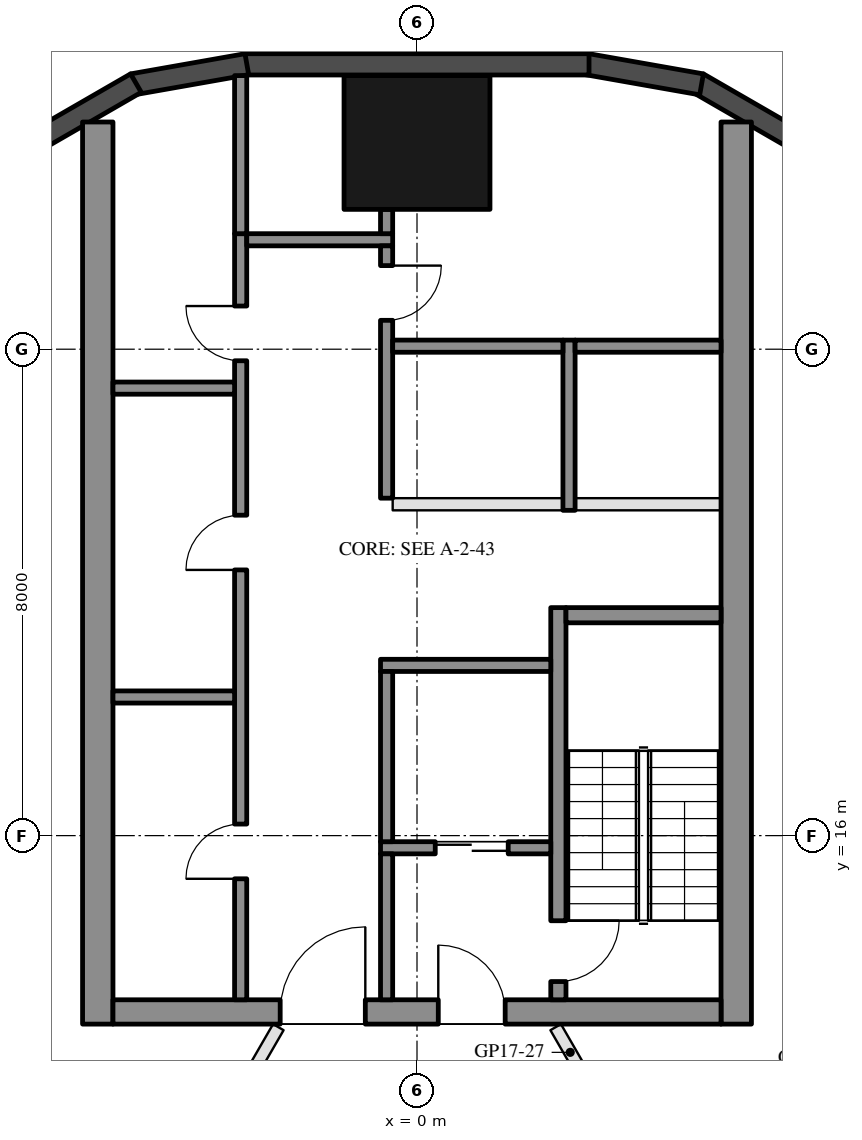
"""IFC4 building model, lengths in metres.
Left out: names, types, materials, properties, quantities, classifications, styles, units other than length and angle.
Written with IfcOpenShell. Run it as: python <this file> out.ifc"""

import sys

from ifc_helpers import new_model, si_unit, direction, frame, frame_2d, origin, origin_2d, place, context, subcontext, project, spatial, rectangle, hollow_rectangle, extrude, element, fill, save


model = new_model("IFC4")
c1 = context("Model", 3, precision=1e-05, world=origin(), true_north=direction((0.0, 1.0)))
c2 = subcontext(c1, "Body", "Model", "MODEL_VIEW")
j1 = project(units=[si_unit("LENGTHUNIT", "METRE"), si_unit("PLANEANGLEUNIT", "RADIAN")], contexts=[c1])
p1 = place(None, origin())
s1 = spatial("IfcSite", under=j1, at=p1, CompositionType="ELEMENT")
p2 = place(p1, origin())
s2 = spatial("IfcBuilding", under=s1, at=p2, CompositionType="ELEMENT")
p3 = place(p2, frame((0.0, 0.0, 183.6)))
s3 = spatial("IfcBuildingStorey", under=s2, at=p3, CompositionType="ELEMENT", Elevation=183.6)
p4 = place(p3, frame((0.0, 27.4, 0.0), z_axis=(0.0, 0.0, 1.0), x_axis=(1.0, 0.0, 0.0)))
e1 = element("IfcColumn", 1, at=p4, inside=s3, PredefinedType="COLUMN", context=c2, shape_type="SweptSolid", body=[
    extrude(hollow_rectangle(XDim=2.4, YDim=2.2, WallThickness=0.06, at=origin_2d()), origin(), (0.0, 0.0, 1.0), 3.7),
])
for number, where, z_axis, x_axis in (
    (2, (6.277, 27.422, 0.0), (0.0, 0.0, 1.0), (-0.866, 0.5, 0.0)),
    (3, (4.68, 28.356, 0.0), (0.0, 0.0, 1.0), (-0.985, 0.174, 0.0)),
):
    element("IfcWall", number, at=place(p3, frame(where, z_axis=z_axis, x_axis=x_axis)), inside=s3, PredefinedType="SOLIDWALL", context=c2, shape_type="SweptSolid", body=[
        extrude(rectangle(XDim=1.91, YDim=0.35, at=frame_2d((0.955, 0.0))), origin(), (0.0, 0.0, 1.0), 3.55),
    ])
p5 = place(p3, frame((2.829, 28.685, 0.0), z_axis=(0.0, 0.0, 1.0), x_axis=(-1.0, 0.0, 0.0)))
e4 = element("IfcWall", 4, at=p5, inside=s3, PredefinedType="SOLIDWALL", context=c2, shape_type="SweptSolid", body=[
    extrude(rectangle(XDim=5.658, YDim=0.35, at=frame_2d((2.829, 0.0))), origin(), (0.0, 0.0, 1.0), 3.55),
])
for number, where, z_axis, x_axis in (
    (5, (-2.799, 28.688, 0.0), (0.0, 0.0, 1.0), (-0.985, -0.174, 0.0)),
    (6, (-4.623, 28.377, 0.0), (0.0, 0.0, 1.0), (-0.866, -0.5, 0.0)),
):
    element("IfcWall", number, at=place(p3, frame(where, z_axis=z_axis, x_axis=x_axis)), inside=s3, PredefinedType="SOLIDWALL", context=c2, shape_type="SweptSolid", body=[
        extrude(rectangle(XDim=1.91, YDim=0.35, at=frame_2d((0.955, 0.0))), origin(), (0.0, 0.0, 1.0), 3.55),
    ])
for number, where, z_axis, x_axis in (
    (7, (5.25, 12.9, 0.0), (0.0, 0.0, 1.0), (0.0, 1.0, 0.0)),
    (8, (-5.25, 12.9, 0.0), (0.0, 0.0, 1.0), (0.0, 1.0, 0.0)),
):
    element("IfcWall", number, at=place(p3, frame(where, z_axis=z_axis, x_axis=x_axis)), inside=s3, PredefinedType="SHEAR", context=c2, shape_type="SweptSolid", body=[
        extrude(rectangle(XDim=14.837, YDim=0.5, at=frame_2d((7.418, 0.0))), origin(), (0.0, 0.0, 1.0), 3.5),
    ])
p6 = place(p3, frame((5.0, 13.1, 0.0), z_axis=(0.0, 0.0, 1.0), x_axis=(-1.0, 0.0, 0.0)))
e9 = element("IfcWall", 9, at=p6, inside=s3, PredefinedType="SHEAR", context=c2, shape_type="SweptSolid", body=[
    extrude(rectangle(XDim=10.0, YDim=0.4, at=frame_2d((5.0, 0.0))), origin(), (0.0, 0.0, 1.0), 3.5),
])
p7 = place(p6, frame((3.55, 0.0, 0.0)))
e10 = element("IfcOpeningElement", 10, at=p7, cuts=e9, PredefinedType="OPENING", context=c2, shape_type="SweptSolid", body=[
    extrude(rectangle(XDim=1.1, YDim=2.1, at=frame_2d((0.55, 1.05))), frame((0.0, 0.21, 0.0), z_axis=(0.0, -1.0, 0.0), x_axis=(1.0, 0.0, 0.0)), (0.0, 0.0, 1.0), 0.42),
])
p8 = place(p6, frame((5.85, 0.0, 0.0)))
e11 = element("IfcOpeningElement", 11, at=p8, cuts=e9, PredefinedType="OPENING", context=c2, shape_type="SweptSolid", body=[
    extrude(rectangle(XDim=1.4, YDim=2.1, at=frame_2d((0.7, 1.05))), frame((0.0, 0.21, 0.0), z_axis=(0.0, -1.0, 0.0), x_axis=(1.0, 0.0, 0.0)), (0.0, 0.0, 1.0), 0.42),
])
p9 = place(p3, frame((2.325, 13.3, 0.0), z_axis=(0.0, 0.0, 1.0), x_axis=(0.0, 1.0, 0.0)))
e12 = element("IfcWall", 12, at=p9, inside=s3, PredefinedType="SHEAR", context=c2, shape_type="SweptSolid", body=[
    extrude(rectangle(XDim=6.45, YDim=0.25, at=frame_2d((3.225, 0.0))), origin(), (0.0, 0.0, 1.0), 3.5),
])
p10 = place(p9, frame((0.3, 0.0, 0.0)))
e13 = element("IfcOpeningElement", 13, at=p10, cuts=e12, PredefinedType="OPENING", context=c2, shape_type="SweptSolid", body=[
    extrude(rectangle(XDim=1.0, YDim=2.1, at=frame_2d((0.5, 1.05))), frame((0.0, 0.135, 0.0), z_axis=(0.0, -1.0, 0.0), x_axis=(1.0, 0.0, 0.0)), (0.0, 0.0, 1.0), 0.27),
])
p11 = place(p3, frame((5.0, 19.625, 0.0), z_axis=(0.0, 0.0, 1.0), x_axis=(-1.0, 0.0, 0.0)))
e14 = element("IfcWall", 14, at=p11, inside=s3, PredefinedType="SHEAR", context=c2, shape_type="SweptSolid", body=[
    extrude(rectangle(XDim=2.55, YDim=0.25, at=frame_2d((1.275, 0.0))), origin(), (0.0, 0.0, 1.0), 3.5),
])
p12 = place(p3, frame((2.2, 18.8, 0.0), z_axis=(0.0, 0.0, 1.0), x_axis=(-1.0, 0.0, 0.0)))
e15 = element("IfcWall", 15, at=p12, inside=s3, PredefinedType="SHEAR", context=c2, shape_type="SweptSolid", body=[
    extrude(rectangle(XDim=2.8, YDim=0.2, at=frame_2d((1.4, 0.0))), origin(), (0.0, 0.0, 1.0), 3.5),
])
p13 = place(p3, frame((2.2, 15.8, 0.0), z_axis=(0.0, 0.0, 1.0), x_axis=(-1.0, 0.0, 0.0)))
e16 = element("IfcWall", 16, at=p13, inside=s3, PredefinedType="SHEAR", context=c2, shape_type="SweptSolid", body=[
    extrude(rectangle(XDim=2.8, YDim=0.2, at=frame_2d((1.4, 0.0))), origin(), (0.0, 0.0, 1.0), 3.5),
])
p14 = place(p13, frame((0.7, 0.0, 0.0)))
e17 = element("IfcOpeningElement", 17, at=p14, cuts=e16, PredefinedType="OPENING", context=c2, shape_type="SweptSolid", body=[
    extrude(rectangle(XDim=1.2, YDim=2.1, at=frame_2d((0.6, 1.05))), frame((0.0, 0.11, 0.0), z_axis=(0.0, -1.0, 0.0), x_axis=(1.0, 0.0, 0.0)), (0.0, 0.0, 1.0), 0.22),
])
p15 = place(p3, frame((-0.5, 15.9, 0.0), z_axis=(0.0, 0.0, 1.0), x_axis=(0.0, 1.0, 0.0)))
e18 = element("IfcWall", 18, at=p15, inside=s3, PredefinedType="SHEAR", context=c2, shape_type="SweptSolid", body=[
    extrude(rectangle(XDim=2.8, YDim=0.2, at=frame_2d((1.4, 0.0))), origin(), (0.0, 0.0, 1.0), 3.5),
])
p16 = place(p3, frame((-0.5, 13.3, 0.0), z_axis=(0.0, 0.0, 1.0), x_axis=(0.0, 1.0, 0.0)))
e19 = element("IfcWall", 19, at=p16, inside=s3, PredefinedType="SHEAR", context=c2, shape_type="SweptSolid", body=[
    extrude(rectangle(XDim=2.4, YDim=0.2, at=frame_2d((1.2, 0.0))), origin(), (0.0, 0.0, 1.0), 3.5),
])
p17 = place(p3, frame((-2.9, 13.3, 0.0), z_axis=(0.0, 0.0, 1.0), x_axis=(0.0, 1.0, 0.0)))
e20 = element("IfcWall", 20, at=p17, inside=s3, PredefinedType="SHEAR", context=c2, shape_type="SweptSolid", body=[
    extrude(rectangle(XDim=12.6, YDim=0.2, at=frame_2d((6.3, 0.0))), origin(), (0.0, 0.0, 1.0), 3.5),
])
p18 = place(p17, frame((1.99, 0.0, 0.0)))
e21 = element("IfcOpeningElement", 21, at=p18, cuts=e20, PredefinedType="OPENING", context=c2, shape_type="SweptSolid", body=[
    extrude(rectangle(XDim=0.9, YDim=2.1, at=frame_2d((0.45, 1.05))), frame((0.0, 0.11, 0.0), z_axis=(0.0, -1.0, 0.0), x_axis=(1.0, 0.0, 0.0)), (0.0, 0.0, 1.0), 0.22),
])
p19 = place(p17, frame((7.07, 0.0, 0.0)))
e22 = element("IfcOpeningElement", 22, at=p19, cuts=e20, PredefinedType="OPENING", context=c2, shape_type="SweptSolid", body=[
    extrude(rectangle(XDim=0.9, YDim=2.1, at=frame_2d((0.45, 1.05))), frame((0.0, 0.11, 0.0), z_axis=(0.0, -1.0, 0.0), x_axis=(1.0, 0.0, 0.0)), (0.0, 0.0, 1.0), 0.22),
])
p20 = place(p17, frame((10.51, 0.0, 0.0)))
e23 = element("IfcOpeningElement", 23, at=p20, cuts=e20, PredefinedType="OPENING", context=c2, shape_type="SweptSolid", body=[
    extrude(rectangle(XDim=0.9, YDim=2.1, at=frame_2d((0.45, 1.05))), frame((0.0, 0.11, 0.0), z_axis=(0.0, -1.0, 0.0), x_axis=(1.0, 0.0, 0.0)), (0.0, 0.0, 1.0), 0.22),
])
p21 = place(p3, frame((-0.4, 25.8, 0.0), z_axis=(0.0, 0.0, 1.0), x_axis=(-1.0, 0.0, 0.0)))
e24 = element("IfcWall", 24, at=p21, inside=s3, PredefinedType="SHEAR", context=c2, shape_type="SweptSolid", body=[
    extrude(rectangle(XDim=2.4, YDim=0.2, at=frame_2d((1.2, 0.0))), origin(), (0.0, 0.0, 1.0), 3.5),
])
p22 = place(p3, frame((-0.5, 21.55, 0.0), z_axis=(0.0, 0.0, 1.0), x_axis=(0.0, 1.0, 0.0)))
e25 = element("IfcWall", 25, at=p22, inside=s3, PredefinedType="SHEAR", context=c2, shape_type="SweptSolid", body=[
    extrude(rectangle(XDim=4.15, YDim=0.2, at=frame_2d((2.075, 0.0))), origin(), (0.0, 0.0, 1.0), 3.5),
])
p23 = place(p22, frame((2.925, 0.0, 0.0)))
e26 = element("IfcOpeningElement", 26, at=p23, cuts=e25, PredefinedType="OPENING", context=c2, shape_type="SweptSolid", body=[
    extrude(rectangle(XDim=0.9, YDim=2.1, at=frame_2d((0.45, 1.05))), frame((0.0, 0.11, 0.0), z_axis=(0.0, -1.0, 0.0), x_axis=(1.0, 0.0, 0.0)), (0.0, 0.0, 1.0), 0.22),
])
for number, where, z_axis, x_axis in (
    (27, (-3.0, 18.28, 0.0), (0.0, 0.0, 1.0), (-1.0, 0.0, 0.0)),
    (28, (-3.0, 23.36, 0.0), (0.0, 0.0, 1.0), (-1.0, 0.0, 0.0)),
):
    element("IfcWall", number, at=place(p3, frame(where, z_axis=z_axis, x_axis=x_axis)), inside=s3, PredefinedType="SHEAR", context=c2, shape_type="SweptSolid", body=[
        extrude(rectangle(XDim=2.0, YDim=0.2, at=frame_2d((1.0, 0.0))), origin(), (0.0, 0.0, 1.0), 3.5),
    ])
p24 = place(p3, frame((-0.5, 25.9, 0.0), z_axis=(0.0, 0.0, 1.0), x_axis=(0.0, 1.0, 0.0)))
e29 = element("IfcWall", 29, at=p24, inside=s3, PredefinedType="SHEAR", context=c2, shape_type="SweptSolid", body=[
    extrude(rectangle(XDim=0.4, YDim=0.2, at=frame_2d((0.2, 0.0))), origin(), (0.0, 0.0, 1.0), 3.5),
])
p25 = place(p3, frame((-2.9, 25.9, 0.0), z_axis=(0.0, 0.0, 1.0), x_axis=(0.0, 1.0, 0.0)))
e30 = element("IfcWall", 30, at=p25, inside=s3, PredefinedType="SHEAR", context=c2, shape_type="SweptSolid", body=[
    extrude(rectangle(XDim=2.6, YDim=0.2, at=frame_2d((1.3, 0.0))), origin(), (0.0, 0.0, 1.0), 3.5),
])
p26 = place(p3, frame((2.5, 21.35, 0.0), z_axis=(0.0, 0.0, 1.0), x_axis=(0.0, 1.0, 0.0)))
e31 = element("IfcWall", 31, at=p26, inside=s3, PredefinedType="SHEAR", context=c2, shape_type="SweptSolid", body=[
    extrude(rectangle(XDim=2.8, YDim=0.2, at=frame_2d((1.4, 0.0))), origin(), (0.0, 0.0, 1.0), 3.5),
])
p27 = place(p3, frame((5.0, 24.05, 0.0), z_axis=(0.0, 0.0, 1.0), x_axis=(-1.0, 0.0, 0.0)))
e32 = element("IfcWall", 32, at=p27, inside=s3, PredefinedType="SHEAR", context=c2, shape_type="SweptSolid", body=[
    extrude(rectangle(XDim=2.4, YDim=0.2, at=frame_2d((1.2, 0.0))), origin(), (0.0, 0.0, 1.0), 3.5),
])
p28 = place(p3, frame((2.4, 24.05, 0.0), z_axis=(0.0, 0.0, 1.0), x_axis=(-1.0, 0.0, 0.0)))
e33 = element("IfcWall", 33, at=p28, inside=s3, PredefinedType="SHEAR", context=c2, shape_type="SweptSolid", body=[
    extrude(rectangle(XDim=2.8, YDim=0.2, at=frame_2d((1.4, 0.0))), origin(), (0.0, 0.0, 1.0), 3.5),
])
p29 = place(p3, frame((5.0, 21.45, 0.0), z_axis=(0.0, 0.0, 1.0), x_axis=(-1.0, 0.0, 0.0)))
e34 = element("IfcWall", 34, at=p29, inside=s3, PredefinedType="PARTITIONING", context=c2, shape_type="SweptSolid", body=[
    extrude(rectangle(XDim=2.4, YDim=0.2, at=frame_2d((1.2, 0.0))), origin(), (0.0, 0.0, 1.0), 3.5),
])
p30 = place(p3, frame((2.4, 21.45, 0.0), z_axis=(0.0, 0.0, 1.0), x_axis=(-1.0, 0.0, 0.0)))
e35 = element("IfcWall", 35, at=p30, inside=s3, PredefinedType="PARTITIONING", context=c2, shape_type="SweptSolid", body=[
    extrude(rectangle(XDim=2.8, YDim=0.2, at=frame_2d((1.4, 0.0))), origin(), (0.0, 0.0, 1.0), 3.5),
])
p31 = place(p3, frame((13.747, 14.75, 0.0), z_axis=(0.0, 0.0, 1.0), x_axis=(-0.866027479907, -0.499996404033, 0.0)))
e36 = element("IfcWall", 36, at=p31, inside=s3, PredefinedType="PARTITIONING", context=c2, shape_type="SweptSolid", body=[
    extrude(rectangle(XDim=10.98, YDim=0.2, at=frame_2d((5.49, 0.0))), origin(), (0.0, 0.0, 1.0), 3.06),
])
p32 = place(p3, frame((-13.417, 13.52, 0.0), z_axis=(0.0, 0.0, 1.0), x_axis=(0.866022637375, -0.500004791531, 0.0)))
e37 = element("IfcWall", 37, at=p32, inside=s3, PredefinedType="PARTITIONING", context=c2, shape_type="SweptSolid", body=[
    extrude(rectangle(XDim=10.08, YDim=0.2, at=frame_2d((5.04, 0.0))), origin(), (0.0, 0.0, 1.0), 3.06),
])
p33 = place(p3, frame((2.281, 12.85, 0.0), z_axis=(0.0, 0.0, 1.0), x_axis=(0.500010364181, -0.866019419939, 0.0)))
e38 = element("IfcWall", 38, at=p33, inside=s3, PredefinedType="PARTITIONING", context=c2, shape_type="SweptSolid", body=[
    extrude(rectangle(XDim=3.988, YDim=0.2, at=frame_2d((1.994, 0.0))), origin(), (0.0, 0.0, 1.0), 2.95),
])
p34 = place(p33, frame((1.494, 0.0, 0.0)))
e39 = element("IfcOpeningElement", 39, at=p34, cuts=e38, PredefinedType="OPENING", context=c2, shape_type="SweptSolid", body=[
    extrude(rectangle(XDim=1.0, YDim=2.1, at=frame_2d((0.5, 1.05))), frame((0.0, 0.11, 0.0), z_axis=(0.0, -1.0, 0.0), x_axis=(1.0, 0.0, 0.0)), (0.0, 0.0, 1.0), 0.22),
])
p35 = place(p3, frame((-4.725, 8.617, 0.0), z_axis=(0.0, 0.0, 1.0), x_axis=(0.499990498062, 0.866030889661, 0.0)))
e40 = element("IfcWall", 40, at=p35, inside=s3, PredefinedType="PARTITIONING", context=c2, shape_type="SweptSolid", body=[
    extrude(rectangle(XDim=4.888, YDim=0.2, at=frame_2d((2.444, 0.0))), origin(), (0.0, 0.0, 1.0), 2.95),
])
p36 = place(p35, frame((1.944, 0.0, 0.0)))
e41 = element("IfcOpeningElement", 41, at=p36, cuts=e40, PredefinedType="OPENING", context=c2, shape_type="SweptSolid", body=[
    extrude(rectangle(XDim=1.0, YDim=2.1, at=frame_2d((0.5, 1.05))), frame((0.0, 0.11, 0.0), z_axis=(0.0, -1.0, 0.0), x_axis=(1.0, 0.0, 0.0)), (0.0, 0.0, 1.0), 0.22),
])
p37 = place(p14, origin())
e42 = element("IfcDoor", 42, at=p37, inside=s3, OperationType="DOUBLE_DOOR_SLIDING", PredefinedType="DOOR", context=c2, shape_type="SweptSolid", body=[
    extrude(rectangle(XDim=1.2, YDim=2.1, at=frame_2d((0.6, 1.05))), frame((0.0, 0.025, 0.0), z_axis=(0.0, -1.0, 0.0), x_axis=(1.0, 0.0, 0.0)), (0.0, 0.0, 1.0), 0.05),
])
fill(e17, e42)
p38 = place(p18, origin())
e43 = element("IfcDoor", 43, at=p38, inside=s3, OperationType="SINGLE_SWING_LEFT", PredefinedType="DOOR", context=c2, shape_type="SweptSolid", body=[
    extrude(rectangle(XDim=0.9, YDim=2.1, at=frame_2d((0.45, 1.05))), frame((0.0, 0.025, 0.0), z_axis=(0.0, -1.0, 0.0), x_axis=(1.0, 0.0, 0.0)), (0.0, 0.0, 1.0), 0.05),
])
fill(e21, e43)
p39 = place(p19, origin())
e44 = element("IfcDoor", 44, at=p39, inside=s3, OperationType="SINGLE_SWING_LEFT", PredefinedType="DOOR", context=c2, shape_type="SweptSolid", body=[
    extrude(rectangle(XDim=0.9, YDim=2.1, at=frame_2d((0.45, 1.05))), frame((0.0, 0.025, 0.0), z_axis=(0.0, -1.0, 0.0), x_axis=(1.0, 0.0, 0.0)), (0.0, 0.0, 1.0), 0.05),
])
fill(e22, e44)
p40 = place(p20, origin())
e45 = element("IfcDoor", 45, at=p40, inside=s3, OperationType="SINGLE_SWING_RIGHT", PredefinedType="DOOR", context=c2, shape_type="SweptSolid", body=[
    extrude(rectangle(XDim=0.9, YDim=2.1, at=frame_2d((0.45, 1.05))), frame((0.0, 0.025, 0.0), z_axis=(0.0, -1.0, 0.0), x_axis=(1.0, 0.0, 0.0)), (0.0, 0.0, 1.0), 0.05),
])
fill(e23, e45)
p41 = place(p23, frame((0.9, 0.0, 0.0), z_axis=(0.0, 0.0, 1.0), x_axis=(-1.0, 0.0, 0.0)))
e46 = element("IfcDoor", 46, at=p41, inside=s3, OperationType="SINGLE_SWING_LEFT", PredefinedType="DOOR", context=c2, shape_type="SweptSolid", body=[
    extrude(rectangle(XDim=0.9, YDim=2.1, at=frame_2d((0.45, 1.05))), frame((0.0, 0.025, 0.0), z_axis=(0.0, -1.0, 0.0), x_axis=(1.0, 0.0, 0.0)), (0.0, 0.0, 1.0), 0.05),
])
fill(e26, e46)
p42 = place(p7, frame((1.1, 0.0, 0.0), z_axis=(0.0, 0.0, 1.0), x_axis=(-1.0, 0.0, 0.0)))
e47 = element("IfcDoor", 47, at=p42, inside=s3, OperationType="SINGLE_SWING_LEFT", PredefinedType="DOOR", context=c2, shape_type="SweptSolid", body=[
    extrude(rectangle(XDim=1.1, YDim=2.1, at=frame_2d((0.55, 1.05))), frame((0.0, 0.025, 0.0), z_axis=(0.0, -1.0, 0.0), x_axis=(1.0, 0.0, 0.0)), (0.0, 0.0, 1.0), 0.05),
])
fill(e10, e47)
p43 = place(p8, frame((1.4, 0.0, 0.0), z_axis=(0.0, 0.0, 1.0), x_axis=(-1.0, 0.0, 0.0)))
e48 = element("IfcDoor", 48, at=p43, inside=s3, OperationType="DOUBLE_DOOR_SINGLE_SWING", PredefinedType="DOOR", context=c2, shape_type="SweptSolid", body=[
    extrude(rectangle(XDim=1.4, YDim=2.1, at=frame_2d((0.7, 1.05))), frame((0.0, 0.025, 0.0), z_axis=(0.0, -1.0, 0.0), x_axis=(1.0, 0.0, 0.0)), (0.0, 0.0, 1.0), 0.05),
])
fill(e11, e48)
p44 = place(p10, frame((1.0, 0.0, 0.0), z_axis=(0.0, 0.0, 1.0), x_axis=(-1.0, 0.0, 0.0)))
e49 = element("IfcDoor", 49, at=p44, inside=s3, OperationType="SINGLE_SWING_LEFT", PredefinedType="DOOR", context=c2, shape_type="SweptSolid", body=[
    extrude(rectangle(XDim=1.0, YDim=2.1, at=frame_2d((0.5, 1.05))), frame((0.0, 0.025, 0.0), z_axis=(0.0, -1.0, 0.0), x_axis=(1.0, 0.0, 0.0)), (0.0, 0.0, 1.0), 0.05),
])
fill(e13, e49)
save(model, sys.argv[1])
